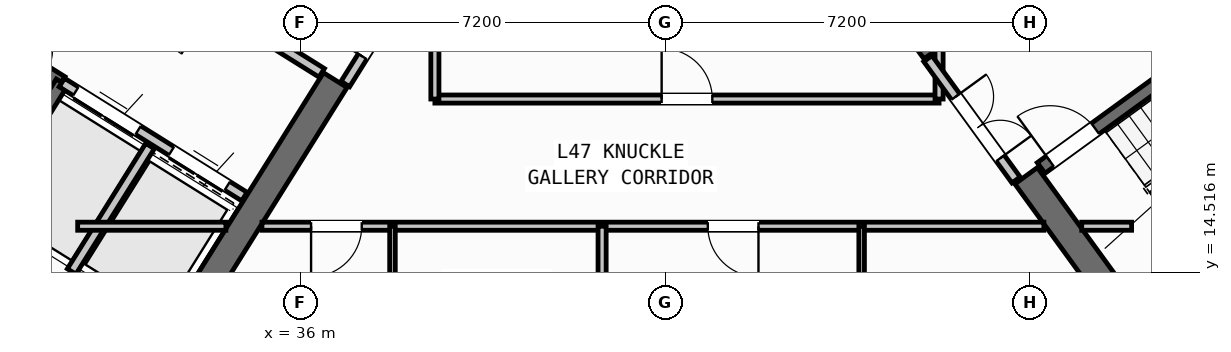
"""IFC4 building model, lengths in metres.
Left out: names, types, materials, properties, quantities, classifications, styles, units other than length and angle.
Written with IfcOpenShell. Run it as: python <this file> out.ifc"""

import sys

from ifc_helpers import new_model, si_unit, direction, frame, frame_2d, origin, place, context, subcontext, project, spatial, rectangle, extrude, source, transform, mapped, element, fill, save


model = new_model("IFC4")
c1 = context("Model", 3, precision=1e-05, world=origin(), true_north=direction((0.0, 1.0)))
c2 = subcontext(c1, "Body", "Model", "MODEL_VIEW")
j1 = project(units=[si_unit("LENGTHUNIT", "METRE"), si_unit("PLANEANGLEUNIT", "RADIAN")], contexts=[c1])
p1 = place(None, origin())
s1 = spatial("IfcSite", under=j1, at=p1, CompositionType="ELEMENT")
p2 = place(p1, origin())
s2 = spatial("IfcBuilding", under=s1, at=p2, CompositionType="ELEMENT")
p3 = place(p2, frame((0.0, 0.0, 187.8)))
s3 = spatial("IfcBuildingStorey", under=s2, at=p3, CompositionType="ELEMENT", Elevation=187.8)
p4 = place(p3, frame((33.366, 12.477, 0.0), z_axis=(0.0, 0.0, 1.0), x_axis=(-0.848047359947, 0.529920442413, 0.0)))
e1 = element("IfcWall", 1, at=p4, inside=s3, PredefinedType="SHEAR", context=c2, shape_type="SweptSolid", body=[
    extrude(rectangle(XDim=13.14, YDim=0.55, at=frame_2d((6.57, 0.0))), origin(), (0.0, 0.0, 1.0), 3.35),
])
p5 = place(p3, frame((36.683, 18.304, 0.0), z_axis=(0.0, 0.0, 1.0), x_axis=(-0.529896466841, -0.848062341122, 0.0)))
e2 = element("IfcWall", 2, at=p5, inside=s3, PredefinedType="SHEAR", context=c2, shape_type="SweptSolid", body=[
    extrude(rectangle(XDim=6.425, YDim=0.55, at=frame_2d((3.212, 0.0))), origin(), (0.0, 0.0, 1.0), 3.35),
])
p6 = place(p3, frame((52.359, 13.14, 0.0), z_axis=(0.0, 0.0, 1.0), x_axis=(0.809014896919, 0.587788139183, 0.0)))
e3 = element("IfcWall", 3, at=p6, inside=s3, PredefinedType="SHEAR", context=c2, shape_type="SweptSolid", body=[
    extrude(rectangle(XDim=12.34, YDim=0.55, at=frame_2d((6.17, 0.0))), origin(), (0.0, 0.0, 1.0), 3.35),
])
p7 = place(p3, frame((52.42, 13.524, 0.0), z_axis=(0.0, 0.0, 1.0), x_axis=(-0.587802113096, 0.809004744015, 0.0)))
e4 = element("IfcWall", 4, at=p7, inside=s3, PredefinedType="SHEAR", context=c2, shape_type="SweptSolid", body=[
    extrude(rectangle(XDim=3.575, YDim=0.55, at=frame_2d((1.788, 0.0))), origin(), (0.0, 0.0, 1.0), 3.35),
])
p8 = place(p3, frame((48.526, 18.884, 0.0), z_axis=(0.0, 0.0, 1.0), x_axis=(-0.587764933797, 0.809031756236, 0.0)))
e5 = element("IfcWall", 5, at=p8, inside=s3, PredefinedType="SHEAR", context=c2, shape_type="SweptSolid", body=[
    extrude(rectangle(XDim=6.425, YDim=0.55, at=frame_2d((3.212, 0.0))), origin(), (0.0, 0.0, 1.0), 3.35),
])
p9 = place(p3, frame((31.76, 12.183, 0.0), z_axis=(0.0, 0.0, 1.0), x_axis=(-0.848047074256, 0.529920899612, 0.0)))
e6 = element("IfcWall", 6, at=p9, inside=s3, PredefinedType="STANDARD", context=c2, shape_type="SweptSolid", body=[
    extrude(rectangle(XDim=30.652, YDim=0.32, at=frame_2d((15.326, 0.0))), origin(), (0.0, 0.0, 1.0), 3.35),
])
p10 = place(p9, frame((15.166, 0.0, 0.0)))
e7 = element("IfcOpeningElement", 7, at=p10, cuts=e6, PredefinedType="OPENING", context=c2, shape_type="SweptSolid", body=[
    extrude(rectangle(XDim=1.2, YDim=2.15, at=frame_2d((0.6, 1.075))), frame((0.0, 0.17, 0.0), z_axis=(0.0, -1.0, 0.0), x_axis=(1.0, 0.0, 0.0)), (0.0, 0.0, 1.0), 0.34),
])
p11 = place(p9, frame((2.015, 0.0, 0.8)))
e8 = element("IfcOpeningElement", 8, at=p11, cuts=e6, PredefinedType="OPENING", context=c2, shape_type="SweptSolid", body=[
    extrude(rectangle(XDim=2.1, YDim=1.55, at=frame_2d((1.05, 0.775))), frame((0.0, 0.17, 0.0), z_axis=(0.0, -1.0, 0.0), x_axis=(1.0, 0.0, 0.0)), (0.0, 0.0, 1.0), 0.34),
])
p12 = place(p9, frame((7.244, 0.0, 0.8)))
e9 = element("IfcOpeningElement", 9, at=p12, cuts=e6, PredefinedType="OPENING", context=c2, shape_type="SweptSolid", body=[
    extrude(rectangle(XDim=2.1, YDim=1.55, at=frame_2d((1.05, 0.775))), frame((0.0, 0.17, 0.0), z_axis=(0.0, -1.0, 0.0), x_axis=(1.0, 0.0, 0.0)), (0.0, 0.0, 1.0), 0.34),
])
p13 = place(p9, frame((12.623, 0.0, 1.0)))
e10 = element("IfcOpeningElement", 10, at=p13, cuts=e6, PredefinedType="OPENING", context=c2, shape_type="SweptSolid", body=[
    extrude(rectangle(XDim=0.9, YDim=1.25, at=frame_2d((0.45, 0.625))), frame((0.0, 0.17, 0.0), z_axis=(0.0, -1.0, 0.0), x_axis=(1.0, 0.0, 0.0)), (0.0, 0.0, 1.0), 0.34),
])
p14 = place(p9, frame((19.565, 0.0, 0.95)))
e11 = element("IfcOpeningElement", 11, at=p14, cuts=e6, PredefinedType="OPENING", context=c2, shape_type="SweptSolid", body=[
    extrude(rectangle(XDim=1.2, YDim=1.4, at=frame_2d((0.6, 0.7))), frame((0.0, 0.17, 0.0), z_axis=(0.0, -1.0, 0.0), x_axis=(1.0, 0.0, 0.0)), (0.0, 0.0, 1.0), 0.34),
])
p15 = place(p9, frame((25.983, 0.0, 1.0)))
e12 = element("IfcOpeningElement", 12, at=p15, cuts=e6, PredefinedType="OPENING", context=c2, shape_type="SweptSolid", body=[
    extrude(rectangle(XDim=0.9, YDim=1.25, at=frame_2d((0.45, 0.625))), frame((0.0, 0.17, 0.0), z_axis=(0.0, -1.0, 0.0), x_axis=(1.0, 0.0, 0.0)), (0.0, 0.0, 1.0), 0.34),
])
p16 = place(p9, frame((28.433, 0.0, 1.0)))
e13 = element("IfcOpeningElement", 13, at=p16, cuts=e6, PredefinedType="OPENING", context=c2, shape_type="SweptSolid", body=[
    extrude(rectangle(XDim=0.9, YDim=1.25, at=frame_2d((0.45, 0.625))), frame((0.0, 0.17, 0.0), z_axis=(0.0, -1.0, 0.0), x_axis=(1.0, 0.0, 0.0)), (0.0, 0.0, 1.0), 0.34),
])
p17 = place(p3, frame((31.28, 18.261, 0.0), z_axis=(0.0, 0.0, 1.0), x_axis=(-0.848051618787, 0.529913626805, 0.0)))
e14 = element("IfcWall", 14, at=p17, inside=s3, PredefinedType="SHEAR", context=c2, shape_type="SweptSolid", body=[
    extrude(rectangle(XDim=7.46, YDim=0.26, at=frame_2d((3.73, 0.0))), origin(), (0.0, 0.0, 1.0), 3.35),
])
p18 = place(p17, frame((0.36, 0.0, 0.0)))
e15 = element("IfcOpeningElement", 15, at=p18, cuts=e14, PredefinedType="OPENING", context=c2, shape_type="SweptSolid", body=[
    extrude(rectangle(XDim=0.86, YDim=2.05, at=frame_2d((0.43, 1.025))), frame((0.0, 0.14, 0.0), z_axis=(0.0, -1.0, 0.0), x_axis=(1.0, 0.0, 0.0)), (0.0, 0.0, 1.0), 0.28),
])
p19 = place(p3, frame((31.288, 18.256, 0.0), z_axis=(0.0, 0.0, 1.0), x_axis=(-0.529943379326, -0.848033026897, 0.0)))
e16 = element("IfcWall", 16, at=p19, inside=s3, PredefinedType="SHEAR", context=c2, shape_type="SweptSolid", body=[
    extrude(rectangle(XDim=3.16, YDim=0.26, at=frame_2d((1.58, 0.0))), origin(), (0.0, 0.0, 1.0), 3.35),
])
p20 = place(p3, frame((34.891, 16.005, 0.0), z_axis=(0.0, 0.0, 1.0), x_axis=(-0.848062873452, 0.529895614884, 0.0)))
e17 = element("IfcWall", 17, at=p20, inside=s3, PredefinedType="STANDARD", context=c2, shape_type="SweptSolid", body=[
    extrude(rectangle(XDim=4.248, YDim=0.2, at=frame_2d((2.124, 0.0))), origin(), (0.0, 0.0, 1.0), 3.34),
])
p21 = place(p20, frame((0.398, 0.0, 0.0)))
e18 = element("IfcOpeningElement", 18, at=p21, cuts=e17, PredefinedType="OPENING", context=c2, shape_type="SweptSolid", body=[
    extrude(rectangle(XDim=1.3, YDim=2.2, at=frame_2d((0.65, 1.1))), frame((0.0, 0.11, 0.0), z_axis=(0.0, -1.0, 0.0), x_axis=(1.0, 0.0, 0.0)), (0.0, 0.0, 1.0), 0.22),
])
p22 = place(p20, frame((2.473, 0.0, 0.0)))
e19 = element("IfcOpeningElement", 19, at=p22, cuts=e17, PredefinedType="OPENING", context=c2, shape_type="SweptSolid", body=[
    extrude(rectangle(XDim=1.45, YDim=2.25, at=frame_2d((0.725, 1.125))), frame((0.0, 0.11, 0.0), z_axis=(0.0, -1.0, 0.0), x_axis=(1.0, 0.0, 0.0)), (0.0, 0.0, 1.0), 0.22),
])
p23 = place(p3, frame((36.417, 18.447, 0.0), z_axis=(0.0, 0.0, 1.0), x_axis=(-0.848064879198, 0.529892404805, 0.0)))
e20 = element("IfcWall", 20, at=p23, inside=s3, PredefinedType="STANDARD", context=c2, shape_type="SweptSolid", body=[
    extrude(rectangle(XDim=5.768, YDim=0.2, at=frame_2d((2.884, 0.0))), origin(), (0.0, 0.0, 1.0), 3.34),
])
p24 = place(p23, frame((2.548, 0.0, 0.0)))
e21 = element("IfcOpeningElement", 21, at=p24, cuts=e20, PredefinedType="OPENING", context=c2, shape_type="SweptSolid", body=[
    extrude(rectangle(XDim=1.15, YDim=2.1, at=frame_2d((0.575, 1.05))), frame((0.0, 0.11, 0.0), z_axis=(0.0, -1.0, 0.0), x_axis=(1.0, 0.0, 0.0)), (0.0, 0.0, 1.0), 0.22),
])
p25 = place(p3, frame((33.029, 17.003, 0.0), z_axis=(0.0, 0.0, 1.0), x_axis=(-0.529916267533, -0.848049968695, 0.0)))
e22 = element("IfcWall", 22, at=p25, inside=s3, PredefinedType="STANDARD", context=c2, shape_type="SweptSolid", body=[
    extrude(rectangle(XDim=2.92, YDim=0.2, at=frame_2d((1.46, 0.0))), origin(), (0.0, 0.0, 1.0), 3.34),
])
p26 = place(p3, frame((52.472, 14.013, 0.0), z_axis=(0.0, 0.0, 1.0), x_axis=(0.809028366311, 0.587769599847, 0.0)))
e23 = element("IfcWall", 23, at=p26, inside=s3, PredefinedType="SHEAR", context=c2, shape_type="SweptSolid", body=[
    extrude(rectangle(XDim=7.33, YDim=0.26, at=frame_2d((3.665, 0.0))), origin(), (0.0, 0.0, 1.0), 3.35),
])
p27 = place(p3, frame((50.615, 16.57, 0.0), z_axis=(0.0, 0.0, 1.0), x_axis=(0.809028366311, 0.587769599847, 0.0)))
e24 = element("IfcWall", 24, at=p27, inside=s3, PredefinedType="SHEAR", context=c2, shape_type="SweptSolid", body=[
    extrude(rectangle(XDim=7.33, YDim=0.26, at=frame_2d((3.665, 0.0))), origin(), (0.0, 0.0, 1.0), 3.35),
])
p28 = place(p27, frame((0.22, 0.0, 0.0)))
e25 = element("IfcOpeningElement", 25, at=p28, cuts=e24, PredefinedType="OPENING", context=c2, shape_type="SweptSolid", body=[
    extrude(rectangle(XDim=1.1, YDim=2.1, at=frame_2d((0.55, 1.05))), frame((0.0, 0.14, 0.0), z_axis=(0.0, -1.0, 0.0), x_axis=(1.0, 0.0, 0.0)), (0.0, 0.0, 1.0), 0.28),
])
p29 = place(p3, frame((38.451, 20.737, 0.0), z_axis=(0.0, 0.0, 1.0), x_axis=(-0.529924799939, -0.848044637038, 0.0)))
e26 = element("IfcWall", 26, at=p29, inside=s3, PredefinedType="STANDARD", context=c2, shape_type="SweptSolid", body=[
    extrude(rectangle(XDim=2.96, YDim=0.2, at=frame_2d((1.48, 0.0))), origin(), (0.0, 0.0, 1.0), 3.34),
])
p30 = place(p29, frame((1.46, 0.0, 0.0)))
e27 = element("IfcOpeningElement", 27, at=p30, cuts=e26, PredefinedType="OPENING", context=c2, shape_type="SweptSolid", body=[
    extrude(rectangle(XDim=0.86, YDim=2.05, at=frame_2d((0.43, 1.025))), frame((0.0, 0.11, 0.0), z_axis=(0.0, -1.0, 0.0), x_axis=(1.0, 0.0, 0.0)), (0.0, 0.0, 1.0), 0.22),
])
p31 = place(p3, frame((31.6, 15.42, 0.0), z_axis=(0.0, 0.0, 1.0), x_axis=(1.0, 0.0, 0.0)))
e28 = element("IfcWall", 28, at=p31, inside=s3, PredefinedType="PARTITIONING", context=c2, shape_type="SweptSolid", body=[
    extrude(rectangle(XDim=2.925, YDim=0.16, at=frame_2d((1.462, 0.0))), origin(), (0.0, 0.0, 1.0), 3.34),
])
p32 = place(p3, frame((35.237, 15.42, 0.0), z_axis=(0.0, 0.0, 1.0), x_axis=(1.0, 0.0, 0.0)))
e29 = element("IfcWall", 29, at=p32, inside=s3, PredefinedType="PARTITIONING", context=c2, shape_type="SweptSolid", body=[
    extrude(rectangle(XDim=15.432, YDim=0.16, at=frame_2d((7.716, 0.0))), origin(), (0.0, 0.0, 1.0), 3.34),
])
p33 = place(p32, frame((0.969, 0.0, 0.0)))
e30 = element("IfcOpeningElement", 30, at=p33, cuts=e29, PredefinedType="OPENING", context=c2, shape_type="SweptSolid", body=[
    extrude(rectangle(XDim=1.0, YDim=2.1, at=frame_2d((0.5, 1.05))), frame((0.0, 0.09, 0.0), z_axis=(0.0, -1.0, 0.0), x_axis=(1.0, 0.0, 0.0)), (0.0, 0.0, 1.0), 0.18),
])
p34 = place(p32, frame((8.799, 0.0, 0.0)))
e31 = element("IfcOpeningElement", 31, at=p34, cuts=e29, PredefinedType="OPENING", context=c2, shape_type="SweptSolid", body=[
    extrude(rectangle(XDim=1.0, YDim=2.1, at=frame_2d((0.5, 1.05))), frame((0.0, 0.09, 0.0), z_axis=(0.0, -1.0, 0.0), x_axis=(1.0, 0.0, 0.0)), (0.0, 0.0, 1.0), 0.18),
])
p35 = place(p3, frame((51.416, 15.42, 0.0), z_axis=(0.0, 0.0, 1.0), x_axis=(1.0, 0.0, 0.0)))
e32 = element("IfcWall", 32, at=p35, inside=s3, PredefinedType="PARTITIONING", context=c2, shape_type="SweptSolid", body=[
    extrude(rectangle(XDim=0.984, YDim=0.16, at=frame_2d((0.492, 0.0))), origin(), (0.0, 0.0, 1.0), 3.34),
])
p36 = place(p3, frame((38.65, 17.93, 0.0), z_axis=(0.0, 0.0, 1.0), x_axis=(1.0, 0.0, 0.0)))
e33 = element("IfcWall", 33, at=p36, inside=s3, PredefinedType="PARTITIONING", context=c2, shape_type="SweptSolid", body=[
    extrude(rectangle(XDim=9.95, YDim=0.16, at=frame_2d((4.975, 0.0))), origin(), (0.0, 0.0, 1.0), 3.34),
])
p37 = place(p36, frame((4.475, 0.0, 0.0)))
e34 = element("IfcOpeningElement", 34, at=p37, cuts=e33, PredefinedType="OPENING", context=c2, shape_type="SweptSolid", body=[
    extrude(rectangle(XDim=1.0, YDim=2.1, at=frame_2d((0.5, 1.05))), frame((0.0, 0.09, 0.0), z_axis=(0.0, -1.0, 0.0), x_axis=(1.0, 0.0, 0.0)), (0.0, 0.0, 1.0), 0.18),
])
p38 = place(p3, frame((38.65, 17.93, 0.0), z_axis=(0.0, 0.0, 1.0), x_axis=(0.0, 1.0, 0.0)))
e35 = element("IfcWall", 35, at=p38, inside=s3, PredefinedType="PARTITIONING", context=c2, shape_type="SweptSolid", body=[
    extrude(rectangle(XDim=2.951, YDim=0.16, at=frame_2d((1.476, 0.0))), origin(), (0.0, 0.0, 1.0), 3.34),
])
p39 = place(p3, frame((48.6, 17.93, 0.0), z_axis=(0.0, 0.0, 1.0), x_axis=(0.0, 1.0, 0.0)))
e36 = element("IfcWall", 36, at=p39, inside=s3, PredefinedType="PARTITIONING", context=c2, shape_type="SweptSolid", body=[
    extrude(rectangle(XDim=0.993, YDim=0.16, at=frame_2d((0.496, 0.0))), origin(), (0.0, 0.0, 1.0), 3.34),
])
p40 = place(p3, frame((50.119, 16.333, 0.0), z_axis=(0.0, 0.0, 1.0), x_axis=(-0.587749856981, 0.809042709391, 0.0)))
e37 = element("IfcWall", 37, at=p40, inside=s3, PredefinedType="STANDARD", context=c2, shape_type="SweptSolid", body=[
    extrude(rectangle(XDim=2.96, YDim=0.2, at=frame_2d((1.48, 0.0))), origin(), (0.0, 0.0, 1.0), 3.34),
])
p41 = place(p40, frame((0.53, 0.0, 0.0)))
e38 = element("IfcOpeningElement", 38, at=p41, cuts=e37, PredefinedType="OPENING", context=c2, shape_type="SweptSolid", body=[
    extrude(rectangle(XDim=1.5, YDim=2.15, at=frame_2d((0.75, 1.075))), frame((0.0, 0.11, 0.0), z_axis=(0.0, -1.0, 0.0), x_axis=(1.0, 0.0, 0.0)), (0.0, 0.0, 1.0), 0.22),
])
p42 = place(p3, frame((41.95, 1.96, 0.0), z_axis=(0.0, 0.0, 1.0), x_axis=(0.0, 1.0, 0.0)))
e39 = element("IfcWall", 39, at=p42, inside=s3, PredefinedType="PARTITIONING", context=c2, shape_type="SweptSolid", body=[
    extrude(rectangle(XDim=13.46, YDim=0.16, at=frame_2d((6.73, 0.0))), origin(), (0.0, 0.0, 1.0), 3.34),
])
p43 = place(p3, frame((37.813, 1.96, 0.0), z_axis=(0.0, 0.0, 1.0), x_axis=(0.0, 1.0, 0.0)))
e40 = element("IfcWall", 40, at=p43, inside=s3, PredefinedType="PARTITIONING", context=c2, shape_type="SweptSolid", body=[
    extrude(rectangle(XDim=13.46, YDim=0.11, at=frame_2d((6.73, 0.0))), origin(), (0.0, 0.0, 1.0), 3.34),
])
p44 = place(p43, frame((5.5, 0.0, 0.0)))
e41 = element("IfcOpeningElement", 41, at=p44, cuts=e40, PredefinedType="OPENING", context=c2, shape_type="SweptSolid", body=[
    extrude(rectangle(XDim=0.92, YDim=2.08, at=frame_2d((0.46, 1.04))), frame((0.0, 0.065, 0.0), z_axis=(0.0, -1.0, 0.0), x_axis=(1.0, 0.0, 0.0)), (0.0, 0.0, 1.0), 0.13),
])
p45 = place(p43, frame((10.45, 0.0, 0.0)))
e42 = element("IfcOpeningElement", 42, at=p45, cuts=e40, PredefinedType="OPENING", context=c2, shape_type="SweptSolid", body=[
    extrude(rectangle(XDim=0.88, YDim=2.08, at=frame_2d((0.44, 1.04))), frame((0.0, 0.065, 0.0), z_axis=(0.0, -1.0, 0.0), x_axis=(1.0, 0.0, 0.0)), (0.0, 0.0, 1.0), 0.13),
])
p46 = place(p3, frame((47.072, 1.96, 0.0), z_axis=(0.0, 0.0, 1.0), x_axis=(0.0, 1.0, 0.0)))
e43 = element("IfcWall", 43, at=p46, inside=s3, PredefinedType="PARTITIONING", context=c2, shape_type="SweptSolid", body=[
    extrude(rectangle(XDim=13.46, YDim=0.11, at=frame_2d((6.73, 0.0))), origin(), (0.0, 0.0, 1.0), 3.34),
])
p47 = place(p46, frame((6.6, 0.0, 0.0)))
e44 = element("IfcOpeningElement", 44, at=p47, cuts=e43, PredefinedType="OPENING", context=c2, shape_type="SweptSolid", body=[
    extrude(rectangle(XDim=0.92, YDim=2.08, at=frame_2d((0.46, 1.04))), frame((0.0, 0.065, 0.0), z_axis=(0.0, -1.0, 0.0), x_axis=(1.0, 0.0, 0.0)), (0.0, 0.0, 1.0), 0.13),
])
p48 = place(p46, frame((11.1, 0.0, 0.0)))
e45 = element("IfcOpeningElement", 45, at=p48, cuts=e43, PredefinedType="OPENING", context=c2, shape_type="SweptSolid", body=[
    extrude(rectangle(XDim=0.88, YDim=2.08, at=frame_2d((0.44, 1.04))), frame((0.0, 0.065, 0.0), z_axis=(0.0, -1.0, 0.0), x_axis=(1.0, 0.0, 0.0)), (0.0, 0.0, 1.0), 0.13),
])
m1 = source(origin(), c2, "Body", "SweptSolid", [
    extrude(rectangle(XDim=1.3, YDim=2.2, at=frame_2d((0.65, 1.1))), frame((0.0, 0.025, 0.0), z_axis=(0.0, -1.0, 0.0), x_axis=(1.0, 0.0, 0.0)), (0.0, 0.0, 1.0), 0.05),
])
p49 = place(p21, origin())
e46 = element("IfcDoor", 46, at=p49, inside=s3, OperationType="DOUBLE_DOOR_SLIDING", PredefinedType="DOOR", context=c2, shape_type="MappedRepresentation", body=[
    mapped(m1, transform((0.0, 0.0, 0.0), scale=1.0)),
])
fill(e18, e46)
m2 = source(origin(), c2, "Body", "SweptSolid", [
    extrude(rectangle(XDim=1.45, YDim=2.25, at=frame_2d((0.725, 1.125))), frame((0.0, 0.025, 0.0), z_axis=(0.0, -1.0, 0.0), x_axis=(1.0, 0.0, 0.0)), (0.0, 0.0, 1.0), 0.05),
])
p50 = place(p22, origin())
e47 = element("IfcDoor", 47, at=p50, inside=s3, OperationType="DOUBLE_DOOR_SLIDING", PredefinedType="DOOR", context=c2, shape_type="MappedRepresentation", body=[
    mapped(m2, transform((0.0, 0.0, 0.0), scale=1.0)),
])
fill(e19, e47)
m3 = source(origin(), c2, "Body", "SweptSolid", [
    extrude(rectangle(XDim=1.1, YDim=2.1, at=frame_2d((0.55, 1.05))), frame((0.0, 0.025, 0.0), z_axis=(0.0, -1.0, 0.0), x_axis=(1.0, 0.0, 0.0)), (0.0, 0.0, 1.0), 0.05),
])
p51 = place(p28, origin())
e48 = element("IfcDoor", 48, at=p51, inside=s3, OperationType="SINGLE_SWING_LEFT", PredefinedType="DOOR", context=c2, shape_type="MappedRepresentation", body=[
    mapped(m3, transform((0.0, 0.0, 0.0), scale=1.0)),
])
fill(e25, e48)
m4 = source(origin(), c2, "Body", "SweptSolid", [
    extrude(rectangle(XDim=1.0, YDim=2.1, at=frame_2d((0.5, 1.05))), frame((0.0, 0.025, 0.0), z_axis=(0.0, -1.0, 0.0), x_axis=(1.0, 0.0, 0.0)), (0.0, 0.0, 1.0), 0.05),
])
p52 = place(p37, origin())
e49 = element("IfcDoor", 49, at=p52, inside=s3, OperationType="SINGLE_SWING_LEFT", PredefinedType="DOOR", context=c2, shape_type="MappedRepresentation", body=[
    mapped(m4, transform((0.0, 0.0, 0.0), scale=1.0)),
])
fill(e34, e49)
m5 = source(origin(), c2, "Body", "SweptSolid", [
    extrude(rectangle(XDim=0.86, YDim=2.05, at=frame_2d((0.43, 1.025))), frame((0.0, 0.025, 0.0), z_axis=(0.0, -1.0, 0.0), x_axis=(1.0, 0.0, 0.0)), (0.0, 0.0, 1.0), 0.05),
])
p53 = place(p30, frame((0.86, 0.0, 0.0), z_axis=(0.0, 0.0, 1.0), x_axis=(-1.0, 0.0, 0.0)))
e50 = element("IfcDoor", 50, at=p53, inside=s3, OperationType="SINGLE_SWING_LEFT", PredefinedType="DOOR", context=c2, shape_type="MappedRepresentation", body=[
    mapped(m5, transform((0.0, 0.0, 0.0), scale=1.0)),
])
fill(e27, e50)
m6 = source(origin(), c2, "Body", "SweptSolid", [
    extrude(rectangle(XDim=1.5, YDim=2.15, at=frame_2d((0.75, 1.075))), frame((0.0, 0.025, 0.0), z_axis=(0.0, -1.0, 0.0), x_axis=(1.0, 0.0, 0.0)), (0.0, 0.0, 1.0), 0.05),
])
p54 = place(p41, frame((1.5, 0.0, 0.0), z_axis=(0.0, 0.0, 1.0), x_axis=(-1.0, 0.0, 0.0)))
e51 = element("IfcDoor", 51, at=p54, inside=s3, OperationType="DOUBLE_DOOR_SINGLE_SWING", PredefinedType="DOOR", context=c2, shape_type="MappedRepresentation", body=[
    mapped(m6, transform((0.0, 0.0, 0.0), scale=1.0)),
])
fill(e38, e51)
p55 = place(p33, frame((1.0, 0.0, 0.0), z_axis=(0.0, 0.0, 1.0), x_axis=(-1.0, 0.0, 0.0)))
e52 = element("IfcDoor", 52, at=p55, inside=s3, OperationType="SINGLE_SWING_RIGHT", PredefinedType="DOOR", context=c2, shape_type="MappedRepresentation", body=[
    mapped(m4, transform((0.0, 0.0, 0.0), scale=1.0)),
])
fill(e30, e52)
p56 = place(p34, frame((1.0, 0.0, 0.0), z_axis=(0.0, 0.0, 1.0), x_axis=(-1.0, 0.0, 0.0)))
e53 = element("IfcDoor", 53, at=p56, inside=s3, OperationType="SINGLE_SWING_LEFT", PredefinedType="DOOR", context=c2, shape_type="MappedRepresentation", body=[
    mapped(m4, transform((0.0, 0.0, 0.0), scale=1.0)),
])
fill(e31, e53)
save(model, sys.argv[1])
